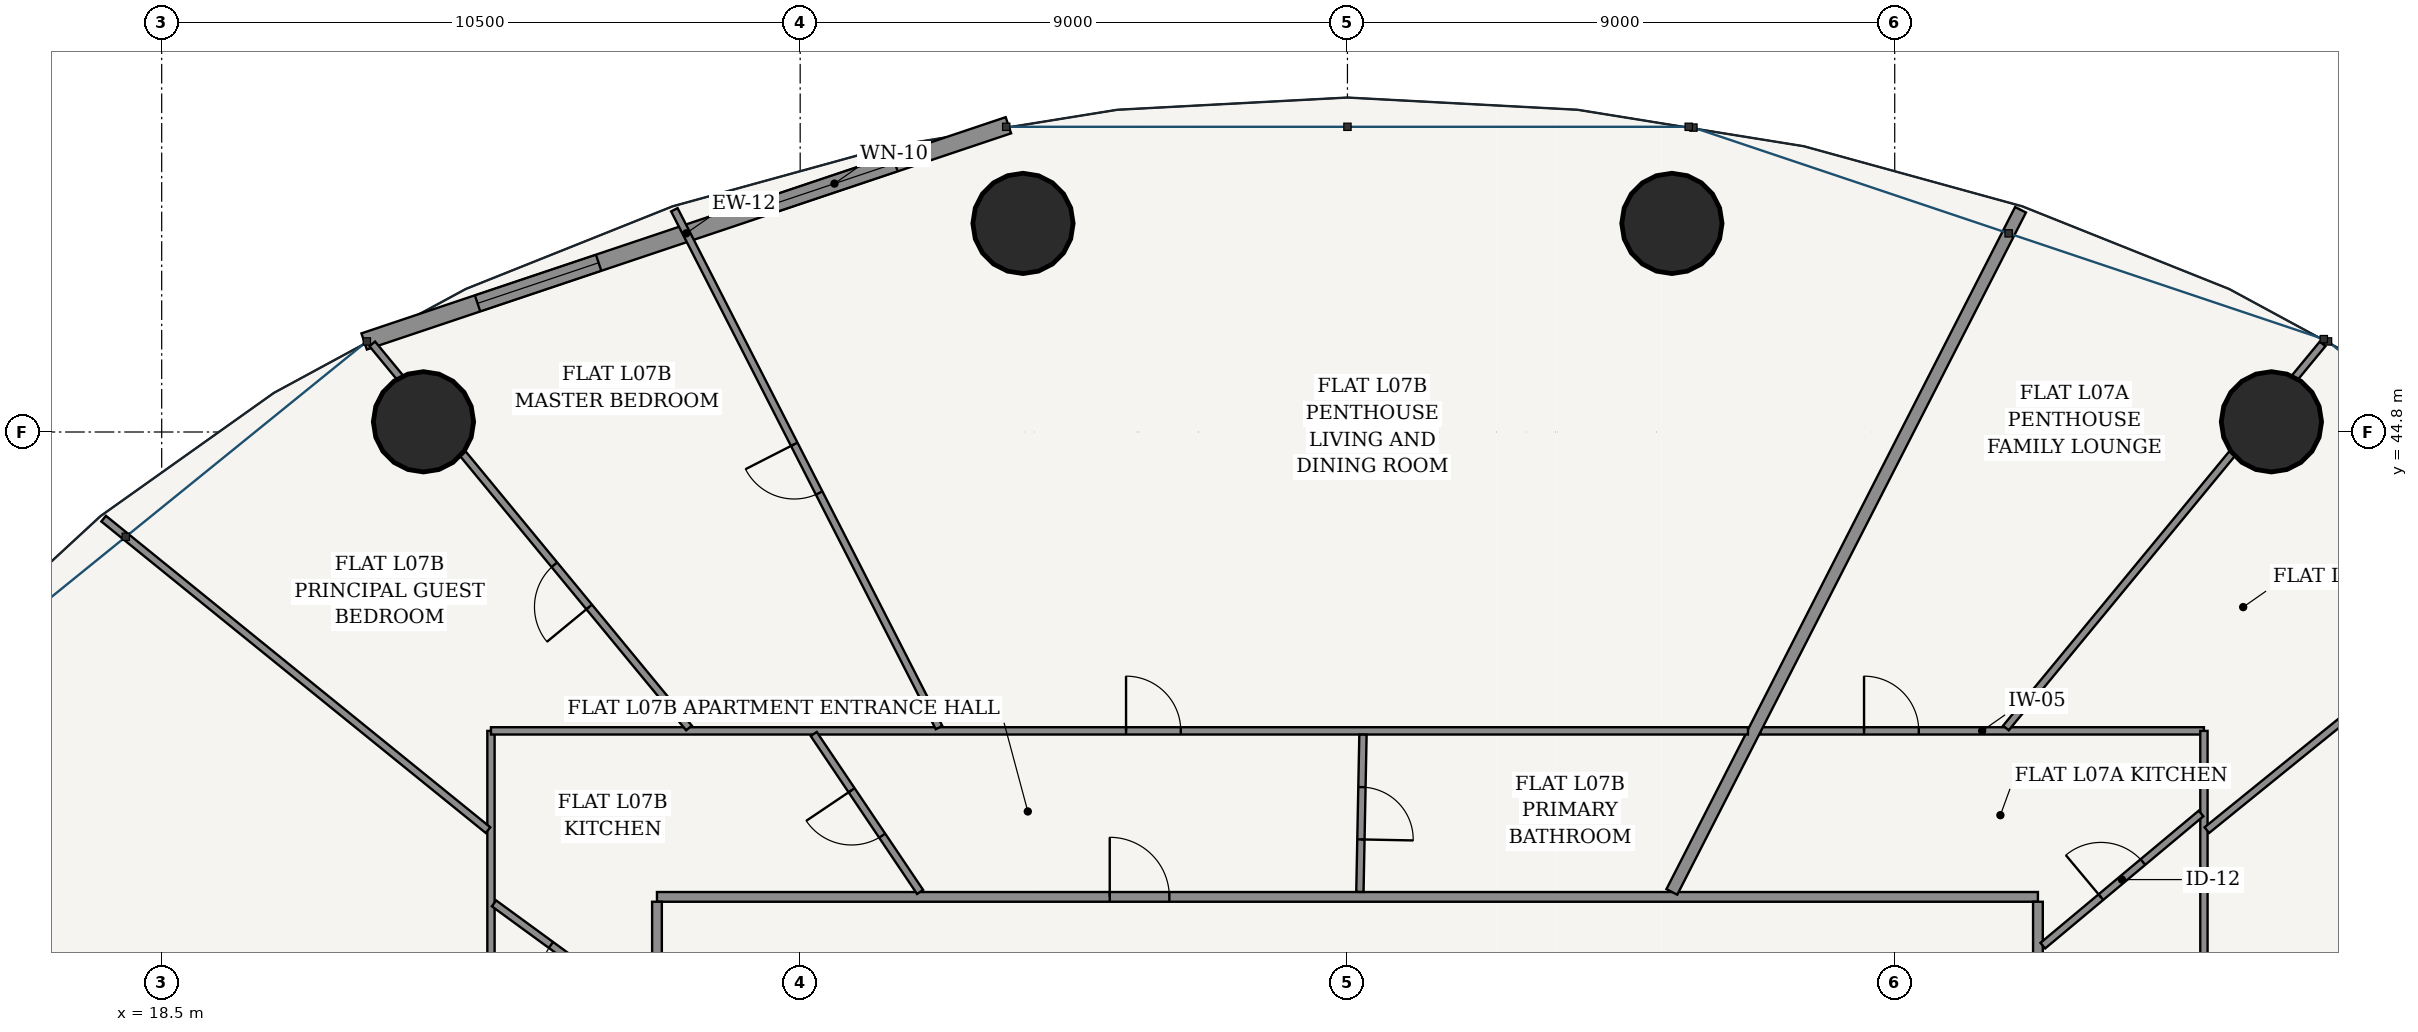
"""IFC4 building model, lengths in metres.
Left out: names, types, materials, properties, quantities, classifications, styles, units other than length and angle.
Written with IfcOpenShell. Run it as: python <this file> out.ifc"""

import sys

from ifc_helpers import new_model, si_unit, direction, frame, frame_2d, origin, origin_2d, place, context, subcontext, project, spatial, rectangle, hollow_circle, extrude, source, transform, mapped, element, fill, save


model = new_model("IFC4")
c1 = context("Model", 3, precision=1e-05, world=origin(), true_north=direction((-0.2419218956, 0.970295726276)))
c2 = subcontext(c1, "Body", "Model", "MODEL_VIEW")
j1 = project(units=[si_unit("LENGTHUNIT", "METRE"), si_unit("PLANEANGLEUNIT", "RADIAN")], contexts=[c1])
p1 = place(None, origin())
s1 = spatial("IfcSite", under=j1, at=p1, CompositionType="ELEMENT")
p2 = place(p1, origin())
s2 = spatial("IfcBuilding", under=s1, at=p2, CompositionType="ELEMENT")
p3 = place(p2, frame((0.0, 0.0, 31.2)))
s3 = spatial("IfcBuildingStorey", under=s2, at=p3, CompositionType="ELEMENT", Elevation=31.2)
for number, where, z_axis, x_axis in (
    (1, (53.195, 44.968, 0.0), (0.0, 0.0, 1.0), (1.0, 0.0, 0.0)),
    (2, (43.336, 48.23, 0.0), (0.0, 0.0, 1.0), (1.0, 0.0, 0.0)),
    (3, (32.664, 48.23, 0.0), (0.0, 0.0, 1.0), (1.0, 0.0, 0.0)),
    (4, (22.805, 44.968, 0.0), (0.0, 0.0, 1.0), (1.0, 0.0, 0.0)),
):
    element("IfcColumn", number, at=place(p3, frame(where, z_axis=z_axis, x_axis=x_axis)), inside=s3, PredefinedType="COLUMN", context=c2, shape_type="SweptSolid", body=[
        extrude(hollow_circle(Radius=0.825, WallThickness=0.05, at=origin_2d()), origin(), (0.0, 0.0, 1.0), 3.6),
    ])
p4 = place(p3, frame((32.424, 49.844, 0.0), z_axis=(0.0, 0.0, 1.0), x_axis=(-0.948041258496, -0.318147406385, 0.0)))
e5 = element("IfcWall", 5, at=p4, inside=s3, PredefinedType="SOLIDWALL", context=c2, shape_type="SweptSolid", body=[
    extrude(rectangle(XDim=11.175, YDim=0.28, at=frame_2d((5.588, 0.0))), origin(), (0.0, 0.0, 1.0), 3.32),
])
p5 = place(p4, frame((1.967, 0.0, 0.85)))
e6 = element("IfcOpeningElement", 6, at=p5, cuts=e5, PredefinedType="OPENING", context=c2, shape_type="SweptSolid", body=[
    extrude(rectangle(XDim=2.1, YDim=1.95, at=frame_2d((1.05, 0.975))), frame((0.0, 0.15, 0.0), z_axis=(0.0, -1.0, 0.0), x_axis=(1.0, 0.0, 0.0)), (0.0, 0.0, 1.0), 0.3),
])
p6 = place(p4, frame((7.108, 0.0, 0.85)))
e7 = element("IfcOpeningElement", 7, at=p6, cuts=e5, PredefinedType="OPENING", context=c2, shape_type="SweptSolid", body=[
    extrude(rectangle(XDim=2.1, YDim=1.95, at=frame_2d((1.05, 0.975))), frame((0.0, 0.15, 0.0), z_axis=(0.0, -1.0, 0.0), x_axis=(1.0, 0.0, 0.0)), (0.0, 0.0, 1.0), 0.3),
])
p7 = place(p3, frame((26.645, 37.155, 0.0), z_axis=(0.0, 0.0, 1.0), x_axis=(1.0, 0.0, 0.0)))
e8 = element("IfcWall", 8, at=p7, inside=s3, PredefinedType="PARTITIONING", context=c2, shape_type="SweptSolid", body=[
    extrude(rectangle(XDim=22.71, YDim=0.16, at=frame_2d((11.355, 0.0))), origin(), (0.0, 0.0, 1.0), 2.688),
])
p8 = place(p7, frame((7.446, 0.0, 0.0)))
e9 = element("IfcOpeningElement", 9, at=p8, cuts=e8, PredefinedType="OPENING", context=c2, shape_type="SweptSolid", body=[
    extrude(rectangle(XDim=0.98, YDim=2.2, at=frame_2d((0.49, 1.1))), frame((0.0, 0.09, 0.0), z_axis=(0.0, -1.0, 0.0), x_axis=(1.0, 0.0, 0.0)), (0.0, 0.0, 1.0), 0.18),
])
p9 = place(p3, frame((26.645, 16.525, 0.0), z_axis=(0.0, 0.0, 1.0), x_axis=(0.0, 1.0, 0.0)))
e10 = element("IfcWall", 10, at=p9, inside=s3, PredefinedType="PARTITIONING", context=c2, shape_type="SweptSolid", body=[
    extrude(rectangle(XDim=20.55, YDim=0.16, at=frame_2d((10.275, 0.0))), origin(), (0.0, 0.0, 1.0), 2.688),
])
p10 = place(p3, frame((49.355, 16.525, 0.0), z_axis=(0.0, 0.0, 1.0), x_axis=(0.0, 1.0, 0.0)))
e11 = element("IfcWall", 11, at=p10, inside=s3, PredefinedType="PARTITIONING", context=c2, shape_type="SweptSolid", body=[
    extrude(rectangle(XDim=20.55, YDim=0.16, at=frame_2d((10.275, 0.0))), origin(), (0.0, 0.0, 1.0), 2.688),
])
p11 = place(p10, frame((15.635, 0.0, 0.0)))
e12 = element("IfcOpeningElement", 12, at=p11, cuts=e11, PredefinedType="OPENING", context=c2, shape_type="SweptSolid", body=[
    extrude(rectangle(XDim=0.98, YDim=2.2, at=frame_2d((0.49, 1.1))), frame((0.0, 0.09, 0.0), z_axis=(0.0, -1.0, 0.0), x_axis=(1.0, 0.0, 0.0)), (0.0, 0.0, 1.0), 0.18),
])
p12 = place(p3, frame((44.791, 39.885, 0.0), z_axis=(0.0, 0.0, 1.0), x_axis=(1.0, 0.0, 0.0)))
e13 = element("IfcWall", 13, at=p12, inside=s3, PredefinedType="PARTITIONING", context=c2, shape_type="SweptSolid", body=[
    extrude(rectangle(XDim=7.294, YDim=0.12, at=frame_2d((3.647, 0.0))), origin(), (0.0, 0.0, 1.0), 2.688),
])
p13 = place(p12, frame((1.705, 0.0, 0.0)))
e14 = element("IfcOpeningElement", 14, at=p13, cuts=e13, PredefinedType="OPENING", context=c2, shape_type="SweptSolid", body=[
    extrude(rectangle(XDim=0.9, YDim=2.15, at=frame_2d((0.45, 1.075))), frame((0.0, 0.07, 0.0), z_axis=(0.0, -1.0, 0.0), x_axis=(1.0, 0.0, 0.0)), (0.0, 0.0, 1.0), 0.14),
])
p14 = place(p3, frame((52.085, 39.885, 0.0), z_axis=(0.0, 0.0, 1.0), x_axis=(0.0, -1.0, 0.0)))
e15 = element("IfcWall", 15, at=p14, inside=s3, PredefinedType="PARTITIONING", context=c2, shape_type="SweptSolid", body=[
    extrude(rectangle(XDim=15.253, YDim=0.12, at=frame_2d((7.627, 0.0))), origin(), (0.0, 0.0, 1.0), 2.688),
])
p15 = place(p14, frame((7.543, 0.0, 0.0)))
e16 = element("IfcOpeningElement", 16, at=p15, cuts=e15, PredefinedType="OPENING", context=c2, shape_type="SweptSolid", body=[
    extrude(rectangle(XDim=0.9, YDim=2.15, at=frame_2d((0.45, 1.075))), frame((0.0, 0.07, 0.0), z_axis=(0.0, -1.0, 0.0), x_axis=(1.0, 0.0, 0.0)), (0.0, 0.0, 1.0), 0.14),
])
p16 = place(p3, frame((52.139, 34.456, 0.0), z_axis=(0.0, 0.0, 1.0), x_axis=(0.879372452045, 0.476134529922, 0.0)))
e17 = element("IfcWall", 17, at=p16, inside=s3, PredefinedType="PARTITIONING", context=c2, shape_type="SweptSolid", body=[
    extrude(rectangle(XDim=11.219, YDim=0.12, at=frame_2d((5.61, 0.0))), origin(), (0.0, 0.0, 1.0), 2.688),
])
p17 = place(p16, frame((4.102, 0.0, 0.0)))
e18 = element("IfcOpeningElement", 18, at=p17, cuts=e17, PredefinedType="OPENING", context=c2, shape_type="SweptSolid", body=[
    extrude(rectangle(XDim=0.9, YDim=2.15, at=frame_2d((0.45, 1.075))), frame((0.0, 0.07, 0.0), z_axis=(0.0, -1.0, 0.0), x_axis=(1.0, 0.0, 0.0)), (0.0, 0.0, 1.0), 0.14),
])
p18 = place(p3, frame((52.133, 38.253, 0.0), z_axis=(0.0, 0.0, 1.0), x_axis=(0.776936623447, 0.629578814087, 0.0)))
e19 = element("IfcWall", 19, at=p18, inside=s3, PredefinedType="PARTITIONING", context=c2, shape_type="SweptSolid", body=[
    extrude(rectangle(XDim=8.136, YDim=0.12, at=frame_2d((4.068, 0.0))), origin(), (0.0, 0.0, 1.0), 2.762),
])
p19 = place(p18, frame((3.618, 0.0, 0.0)))
e20 = element("IfcOpeningElement", 20, at=p19, cuts=e19, PredefinedType="OPENING", context=c2, shape_type="SweptSolid", body=[
    extrude(rectangle(XDim=0.9, YDim=2.15, at=frame_2d((0.45, 1.075))), frame((0.0, 0.07, 0.0), z_axis=(0.0, -1.0, 0.0), x_axis=(1.0, 0.0, 0.0)), (0.0, 0.0, 1.0), 0.14),
])
p20 = place(p3, frame((48.829, 39.933, 0.0), z_axis=(0.0, 0.0, 1.0), x_axis=(0.636192172227, 0.771530634516, 0.0)))
e21 = element("IfcWall", 21, at=p20, inside=s3, PredefinedType="PARTITIONING", context=c2, shape_type="SweptSolid", body=[
    extrude(rectangle(XDim=8.186, YDim=0.12, at=frame_2d((4.093, 0.0))), origin(), (0.0, 0.0, 1.0), 2.688),
])
p21 = place(p3, frame((49.435, 36.353, 0.0), z_axis=(0.0, 0.0, 1.0), x_axis=(0.76742398833, 0.641139939589, 0.0)))
e22 = element("IfcWall", 22, at=p21, inside=s3, PredefinedType="PARTITIONING", context=c2, shape_type="SweptSolid", body=[
    extrude(rectangle(XDim=3.391, YDim=0.12, at=frame_2d((1.695, 0.0))), origin(), (0.0, 0.0, 1.0), 2.999),
])
p22 = place(p21, frame((1.246, 0.0, 0.0)))
e23 = element("IfcOpeningElement", 23, at=p22, cuts=e22, PredefinedType="OPENING", context=c2, shape_type="SweptSolid", body=[
    extrude(rectangle(XDim=0.9, YDim=2.15, at=frame_2d((0.45, 1.075))), frame((0.0, 0.07, 0.0), z_axis=(0.0, -1.0, 0.0), x_axis=(1.0, 0.0, 0.0)), (0.0, 0.0, 1.0), 0.14),
])
p23 = place(p3, frame((43.335, 37.237, 0.0), z_axis=(0.0, 0.0, 1.0), x_axis=(0.455148959499, 0.890415310216, 0.0)))
e24 = element("IfcWall", 24, at=p23, inside=s3, PredefinedType="PARTITIONING", context=c2, shape_type="SweptSolid", body=[
    extrude(rectangle(XDim=12.598, YDim=0.2, at=frame_2d((6.299, 0.0))), origin(), (0.0, 0.0, 1.0), 2.762),
])
p24 = place(p3, frame((23.915, 29.172, 0.0), z_axis=(0.0, 0.0, 1.0), x_axis=(0.0, 1.0, 0.0)))
e25 = element("IfcWall", 25, at=p24, inside=s3, PredefinedType="PARTITIONING", context=c2, shape_type="SweptSolid", body=[
    extrude(rectangle(XDim=10.713, YDim=0.12, at=frame_2d((5.356, 0.0))), origin(), (0.0, 0.0, 1.0), 2.688),
])
p25 = place(p24, frame((3.666, 0.0, 0.0)))
e26 = element("IfcOpeningElement", 26, at=p25, cuts=e25, PredefinedType="OPENING", context=c2, shape_type="SweptSolid", body=[
    extrude(rectangle(XDim=0.9, YDim=2.15, at=frame_2d((0.45, 1.075))), frame((0.0, 0.07, 0.0), z_axis=(0.0, -1.0, 0.0), x_axis=(1.0, 0.0, 0.0)), (0.0, 0.0, 1.0), 0.14),
])
p26 = place(p3, frame((23.915, 39.885, 0.0), z_axis=(0.0, 0.0, 1.0), x_axis=(1.0, 0.0, 0.0)))
e27 = element("IfcWall", 27, at=p26, inside=s3, PredefinedType="PARTITIONING", context=c2, shape_type="SweptSolid", body=[
    extrude(rectangle(XDim=20.671, YDim=0.12, at=frame_2d((10.336, 0.0))), origin(), (0.0, 0.0, 1.0), 2.688),
])
p27 = place(p26, frame((10.444, 0.0, 0.0)))
e28 = element("IfcOpeningElement", 28, at=p27, cuts=e27, PredefinedType="OPENING", context=c2, shape_type="SweptSolid", body=[
    extrude(rectangle(XDim=0.9, YDim=2.15, at=frame_2d((0.45, 1.075))), frame((0.0, 0.07, 0.0), z_axis=(0.0, -1.0, 0.0), x_axis=(1.0, 0.0, 0.0)), (0.0, 0.0, 1.0), 0.14),
])
p28 = place(p3, frame((31.283, 39.94, 0.0), z_axis=(0.0, 0.0, 1.0), x_axis=(-0.455131303234, 0.890424335256, 0.0)))
e29 = element("IfcWall", 29, at=p28, inside=s3, PredefinedType="PARTITIONING", context=c2, shape_type="SweptSolid", body=[
    extrude(rectangle(XDim=9.562, YDim=0.12, at=frame_2d((4.781, 0.0))), origin(), (0.0, 0.0, 1.0), 2.762),
])
p29 = place(p28, frame((4.331, 0.0, 0.0)))
e30 = element("IfcOpeningElement", 30, at=p29, cuts=e29, PredefinedType="OPENING", context=c2, shape_type="SweptSolid", body=[
    extrude(rectangle(XDim=0.9, YDim=2.15, at=frame_2d((0.45, 1.075))), frame((0.0, 0.07, 0.0), z_axis=(0.0, -1.0, 0.0), x_axis=(1.0, 0.0, 0.0)), (0.0, 0.0, 1.0), 0.14),
])
p30 = place(p3, frame((27.171, 39.933, 0.0), z_axis=(0.0, 0.0, 1.0), x_axis=(-0.636192172227, 0.771530634516, 0.0)))
e31 = element("IfcWall", 31, at=p30, inside=s3, PredefinedType="PARTITIONING", context=c2, shape_type="SweptSolid", body=[
    extrude(rectangle(XDim=8.186, YDim=0.12, at=frame_2d((4.093, 0.0))), origin(), (0.0, 0.0, 1.0), 2.688),
])
p31 = place(p30, frame((2.579, 0.0, 0.0)))
e32 = element("IfcOpeningElement", 32, at=p31, cuts=e31, PredefinedType="OPENING", context=c2, shape_type="SweptSolid", body=[
    extrude(rectangle(XDim=0.9, YDim=2.15, at=frame_2d((0.45, 1.075))), frame((0.0, 0.07, 0.0), z_axis=(0.0, -1.0, 0.0), x_axis=(1.0, 0.0, 0.0)), (0.0, 0.0, 1.0), 0.14),
])
p32 = place(p3, frame((23.867, 38.253, 0.0), z_axis=(0.0, 0.0, 1.0), x_axis=(-0.776936623447, 0.629578814087, 0.0)))
e33 = element("IfcWall", 33, at=p32, inside=s3, PredefinedType="PARTITIONING", context=c2, shape_type="SweptSolid", body=[
    extrude(rectangle(XDim=8.136, YDim=0.12, at=frame_2d((4.068, 0.0))), origin(), (0.0, 0.0, 1.0), 2.762),
])
p33 = place(p3, frame((38.205, 37.237, 0.0), z_axis=(0.0, 0.0, 1.0), x_axis=(0.019633676934, 0.999807240787, 0.0)))
e34 = element("IfcWall", 34, at=p33, inside=s3, PredefinedType="PARTITIONING", context=c2, shape_type="SweptSolid", body=[
    extrude(rectangle(XDim=2.586, YDim=0.12, at=frame_2d((1.293, 0.0))), origin(), (0.0, 0.0, 1.0), 3.32),
])
p34 = place(p33, frame((0.863, 0.0, 0.0)))
e35 = element("IfcOpeningElement", 35, at=p34, cuts=e34, PredefinedType="OPENING", context=c2, shape_type="SweptSolid", body=[
    extrude(rectangle(XDim=0.86, YDim=2.15, at=frame_2d((0.43, 1.075))), frame((0.0, 0.07, 0.0), z_axis=(0.0, -1.0, 0.0), x_axis=(1.0, 0.0, 0.0)), (0.0, 0.0, 1.0), 0.14),
])
p35 = place(p3, frame((30.972, 37.237, 0.0), z_axis=(0.0, 0.0, 1.0), x_axis=(-0.558563154585, 0.829461995717, 0.0)))
e36 = element("IfcWall", 36, at=p35, inside=s3, PredefinedType="PARTITIONING", context=c2, shape_type="SweptSolid", body=[
    extrude(rectangle(XDim=3.131, YDim=0.12, at=frame_2d((1.565, 0.0))), origin(), (0.0, 0.0, 1.0), 3.32),
])
p36 = place(p35, frame((1.115, 0.0, 0.0)))
e37 = element("IfcOpeningElement", 37, at=p36, cuts=e36, PredefinedType="OPENING", context=c2, shape_type="SweptSolid", body=[
    extrude(rectangle(XDim=0.9, YDim=2.15, at=frame_2d((0.45, 1.075))), frame((0.0, 0.07, 0.0), z_axis=(0.0, -1.0, 0.0), x_axis=(1.0, 0.0, 0.0)), (0.0, 0.0, 1.0), 0.14),
])
p37 = place(p3, frame((26.565, 35.15, 0.0), z_axis=(0.0, 0.0, 1.0), x_axis=(-0.807606444557, 0.589721824855, 0.0)))
e38 = element("IfcWall", 38, at=p37, inside=s3, PredefinedType="PARTITIONING", context=c2, shape_type="SweptSolid", body=[
    extrude(rectangle(XDim=3.219, YDim=0.12, at=frame_2d((1.61, 0.0))), origin(), (0.0, 0.0, 1.0), 3.32),
])
p38 = place(p37, frame((1.16, 0.0, 0.0)))
e39 = element("IfcOpeningElement", 39, at=p38, cuts=e38, PredefinedType="OPENING", context=c2, shape_type="SweptSolid", body=[
    extrude(rectangle(XDim=0.9, YDim=2.15, at=frame_2d((0.45, 1.075))), frame((0.0, 0.07, 0.0), z_axis=(0.0, -1.0, 0.0), x_axis=(1.0, 0.0, 0.0)), (0.0, 0.0, 1.0), 0.14),
])
m1 = source(origin(), c2, "Body", "SweptSolid", [
    extrude(rectangle(XDim=2.1, YDim=1.95, at=frame_2d((1.05, 0.975))), frame((0.0, 0.03, 0.0), z_axis=(0.0, -1.0, 0.0), x_axis=(1.0, 0.0, 0.0)), (0.0, 0.0, 1.0), 0.06),
])
p39 = place(p5, origin())
e40 = element("IfcWindow", 40, at=p39, inside=s3, PartitioningType="SINGLE_PANEL", PredefinedType="WINDOW", context=c2, shape_type="MappedRepresentation", body=[
    mapped(m1, transform((0.0, 0.0, 0.0), scale=1.0)),
])
fill(e6, e40)
p40 = place(p6, origin())
e41 = element("IfcWindow", 41, at=p40, inside=s3, PartitioningType="SINGLE_PANEL", PredefinedType="WINDOW", context=c2, shape_type="MappedRepresentation", body=[
    mapped(m1, transform((0.0, 0.0, 0.0), scale=1.0)),
])
fill(e7, e41)
m2 = source(origin(), c2, "Body", "SweptSolid", [
    extrude(rectangle(XDim=0.9, YDim=2.15, at=frame_2d((0.45, 1.075))), frame((0.0, 0.025, 0.0), z_axis=(0.0, -1.0, 0.0), x_axis=(1.0, 0.0, 0.0)), (0.0, 0.0, 1.0), 0.05),
])
p41 = place(p22, origin())
e42 = element("IfcDoor", 42, at=p41, inside=s3, OperationType="SINGLE_SWING_LEFT", PredefinedType="DOOR", context=c2, shape_type="MappedRepresentation", body=[
    mapped(m2, transform((0.0, 0.0, 0.0), scale=1.0)),
])
fill(e23, e42)
p42 = place(p13, origin())
e43 = element("IfcDoor", 43, at=p42, inside=s3, OperationType="SINGLE_SWING_LEFT", PredefinedType="DOOR", context=c2, shape_type="MappedRepresentation", body=[
    mapped(m2, transform((0.0, 0.0, 0.0), scale=1.0)),
])
fill(e14, e43)
m3 = source(origin(), c2, "Body", "SweptSolid", [
    extrude(rectangle(XDim=0.98, YDim=2.2, at=frame_2d((0.49, 1.1))), frame((0.0, 0.025, 0.0), z_axis=(0.0, -1.0, 0.0), x_axis=(1.0, 0.0, 0.0)), (0.0, 0.0, 1.0), 0.05),
])
p43 = place(p8, origin())
e44 = element("IfcDoor", 44, at=p43, inside=s3, OperationType="SINGLE_SWING_LEFT", PredefinedType="DOOR", context=c2, shape_type="MappedRepresentation", body=[
    mapped(m3, transform((0.0, 0.0, 0.0), scale=1.0)),
])
fill(e9, e44)
m4 = source(origin(), c2, "Body", "SweptSolid", [
    extrude(rectangle(XDim=0.86, YDim=2.15, at=frame_2d((0.43, 1.075))), frame((0.0, 0.025, 0.0), z_axis=(0.0, -1.0, 0.0), x_axis=(1.0, 0.0, 0.0)), (0.0, 0.0, 1.0), 0.05),
])
p44 = place(p34, frame((0.86, 0.0, 0.0), z_axis=(0.0, 0.0, 1.0), x_axis=(-1.0, 0.0, 0.0)))
e45 = element("IfcDoor", 45, at=p44, inside=s3, OperationType="SINGLE_SWING_RIGHT", PredefinedType="DOOR", context=c2, shape_type="MappedRepresentation", body=[
    mapped(m4, transform((0.0, 0.0, 0.0), scale=1.0)),
])
fill(e35, e45)
p45 = place(p27, origin())
e46 = element("IfcDoor", 46, at=p45, inside=s3, OperationType="SINGLE_SWING_LEFT", PredefinedType="DOOR", context=c2, shape_type="MappedRepresentation", body=[
    mapped(m2, transform((0.0, 0.0, 0.0), scale=1.0)),
])
fill(e28, e46)
p46 = place(p36, origin())
e47 = element("IfcDoor", 47, at=p46, inside=s3, OperationType="SINGLE_SWING_RIGHT", PredefinedType="DOOR", context=c2, shape_type="MappedRepresentation", body=[
    mapped(m2, transform((0.0, 0.0, 0.0), scale=1.0)),
])
fill(e37, e47)
p47 = place(p38, origin())
e48 = element("IfcDoor", 48, at=p47, inside=s3, OperationType="SINGLE_SWING_LEFT", PredefinedType="DOOR", context=c2, shape_type="MappedRepresentation", body=[
    mapped(m2, transform((0.0, 0.0, 0.0), scale=1.0)),
])
fill(e39, e48)
p48 = place(p29, origin())
e49 = element("IfcDoor", 49, at=p48, inside=s3, OperationType="SINGLE_SWING_RIGHT", PredefinedType="DOOR", context=c2, shape_type="MappedRepresentation", body=[
    mapped(m2, transform((0.0, 0.0, 0.0), scale=1.0)),
])
fill(e30, e49)
p49 = place(p31, origin())
e50 = element("IfcDoor", 50, at=p49, inside=s3, OperationType="SINGLE_SWING_LEFT", PredefinedType="DOOR", context=c2, shape_type="MappedRepresentation", body=[
    mapped(m2, transform((0.0, 0.0, 0.0), scale=1.0)),
])
fill(e32, e50)
save(model, sys.argv[1])
